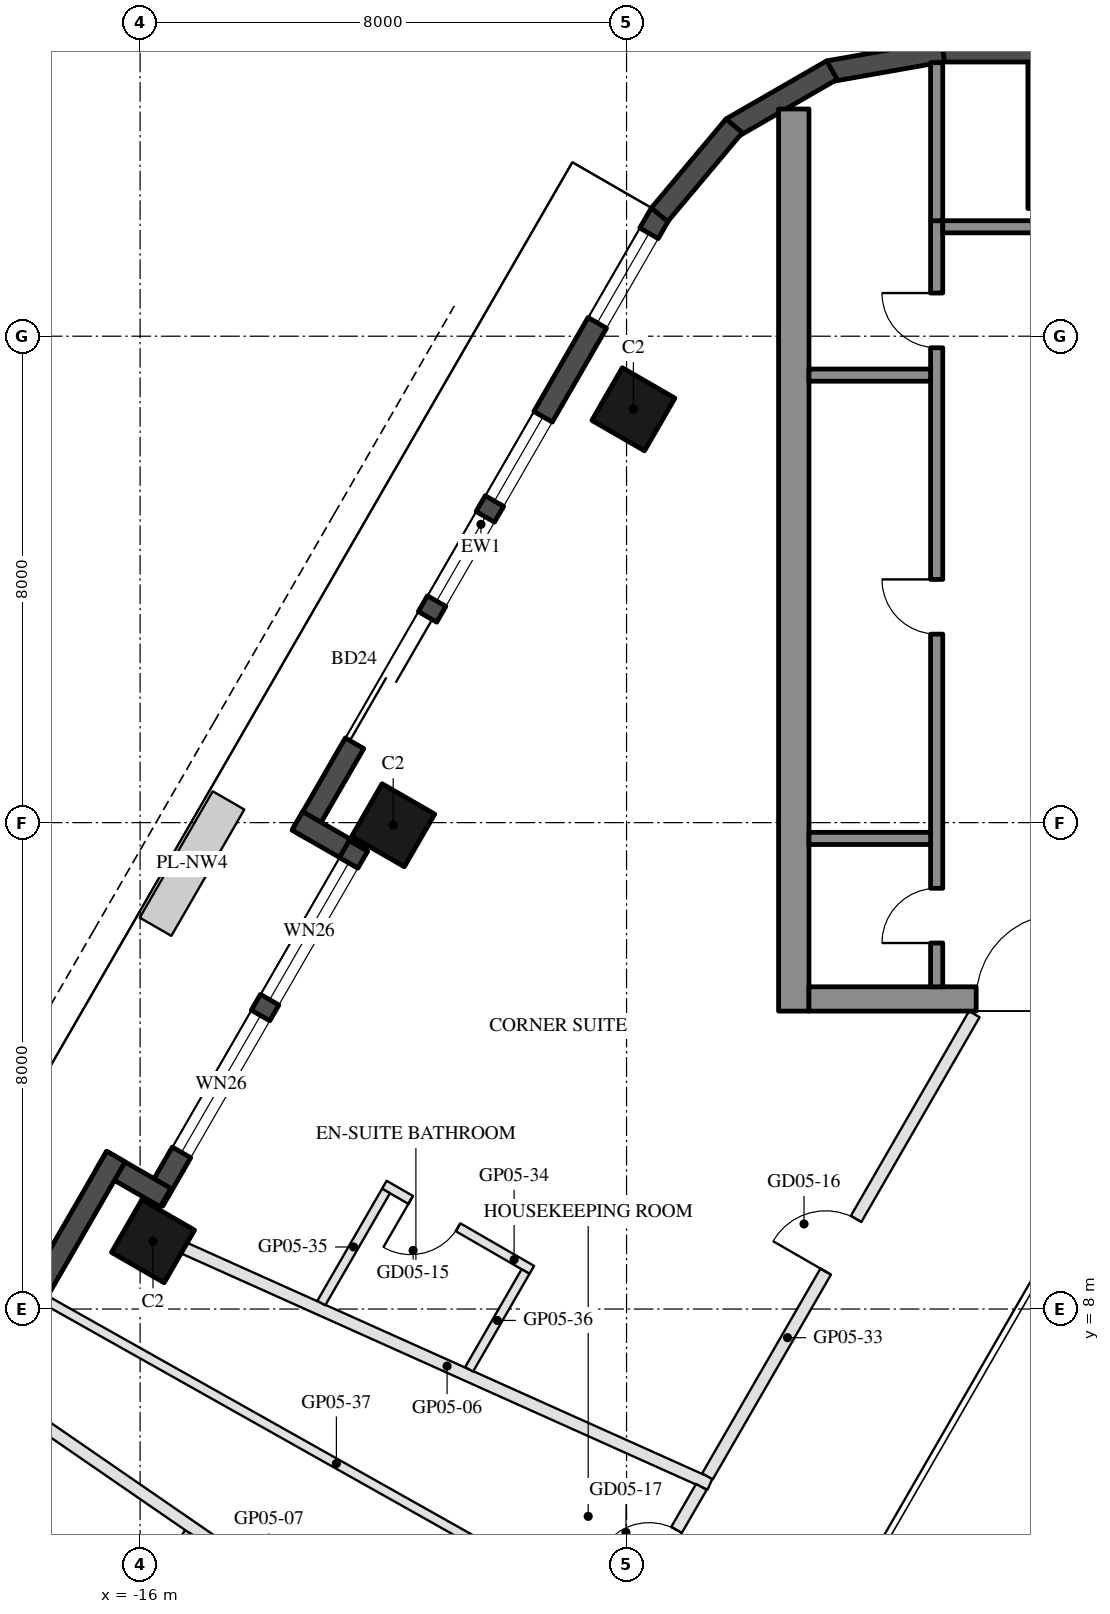
"""IFC4 building model, lengths in metres.
Left out: names, types, materials, properties, quantities, classifications, styles, units other than length and angle.
Written with IfcOpenShell. Run it as: python <this file> out.ifc"""

import sys

from ifc_helpers import new_model, si_unit, direction, frame, frame_2d, origin, origin_2d, place, context, subcontext, project, spatial, rectangle, hollow_rectangle, extrude, element, fill, save


model = new_model("IFC4")
c1 = context("Model", 3, precision=1e-05, world=origin(), true_north=direction((0.0, 1.0)))
c2 = subcontext(c1, "Body", "Model", "MODEL_VIEW")
j1 = project(units=[si_unit("LENGTHUNIT", "METRE"), si_unit("PLANEANGLEUNIT", "RADIAN")], contexts=[c1])
p1 = place(None, origin())
s1 = spatial("IfcSite", under=j1, at=p1, CompositionType="ELEMENT")
p2 = place(p1, origin())
s2 = spatial("IfcBuilding", under=s1, at=p2, CompositionType="ELEMENT")
p3 = place(p2, frame((0.0, 0.0, 83.5)))
s3 = spatial("IfcBuildingStorey", under=s2, at=p3, CompositionType="ELEMENT", Elevation=83.5)
for number, where, z_axis, x_axis in (
    (1, (-7.888, 22.798, 0.0), (0.0, 0.0, 1.0), (0.5, 0.866, 0.0)),
    (2, (-11.838, 15.957, 0.0), (0.0, 0.0, 1.0), (0.5, 0.866, 0.0)),
    (3, (-15.788, 9.115, 0.0), (0.0, 0.0, 1.0), (0.5, 0.866, 0.0)),
):
    element("IfcColumn", number, at=place(p3, frame(where, z_axis=z_axis, x_axis=x_axis)), inside=s3, PredefinedType="COLUMN", context=c2, shape_type="SweptSolid", body=[
        extrude(hollow_rectangle(XDim=1.0, YDim=1.0, WallThickness=0.045, at=origin_2d()), origin(), (0.0, 0.0, 1.0), 3.7),
    ])
p4 = place(p3, frame((0.0, 27.3, 0.0), z_axis=(0.0, 0.0, 1.0), x_axis=(1.0, 0.0, 0.0)))
e4 = element("IfcColumn", 4, at=p4, inside=s3, PredefinedType="COLUMN", context=c2, shape_type="SweptSolid", body=[
    extrude(hollow_rectangle(XDim=2.8, YDim=2.4, WallThickness=0.07, at=origin_2d()), origin(), (0.0, 0.0, 1.0), 3.7),
])
p5 = place(p3, frame((-7.441, 26.022, 0.0), z_axis=(0.0, 0.0, 1.0), x_axis=(-0.499992533062, -0.86602971478, 0.0)))
e5 = element("IfcWall", 5, at=p5, inside=s3, PredefinedType="SOLIDWALL", context=c2, shape_type="SweptSolid", body=[
    extrude(rectangle(XDim=11.816, YDim=0.35, at=frame_2d((5.908, 0.0))), origin(), (0.0, 0.0, 1.0), 3.55),
])
p6 = place(p5, frame((0.381, 0.0, 0.3)))
e6 = element("IfcOpeningElement", 6, at=p6, cuts=e5, PredefinedType="OPENING", context=c2, shape_type="SweptSolid", body=[
    extrude(rectangle(XDim=1.7, YDim=2.65, at=frame_2d((0.85, 1.325))), frame((0.0, 0.185, 0.0), z_axis=(0.0, -1.0, 0.0), x_axis=(1.0, 0.0, 0.0)), (0.0, 0.0, 1.0), 0.37),
])
p7 = place(p5, frame((7.666, 0.0, 0.0)))
e7 = element("IfcOpeningElement", 7, at=p7, cuts=e5, PredefinedType="OPENING", context=c2, shape_type="SweptSolid", body=[
    extrude(rectangle(XDim=2.4, YDim=2.4, at=frame_2d((1.2, 1.2))), frame((0.0, 0.185, 0.0), z_axis=(0.0, -1.0, 0.0), x_axis=(1.0, 0.0, 0.0)), (0.0, 0.0, 1.0), 0.37),
])
p8 = place(p5, frame((3.865, 0.0, 0.3)))
e8 = element("IfcOpeningElement", 8, at=p8, cuts=e5, PredefinedType="OPENING", context=c2, shape_type="SweptSolid", body=[
    extrude(rectangle(XDim=1.6, YDim=2.65, at=frame_2d((0.8, 1.325))), frame((0.0, 0.185, 0.0), z_axis=(0.0, -1.0, 0.0), x_axis=(1.0, 0.0, 0.0)), (0.0, 0.0, 1.0), 0.37),
])
p9 = place(p5, frame((5.765, 0.0, 0.3)))
e9 = element("IfcOpeningElement", 9, at=p9, cuts=e5, PredefinedType="OPENING", context=c2, shape_type="SweptSolid", body=[
    extrude(rectangle(XDim=1.6, YDim=2.65, at=frame_2d((0.8, 1.325))), frame((0.0, 0.185, 0.0), z_axis=(0.0, -1.0, 0.0), x_axis=(1.0, 0.0, 0.0)), (0.0, 0.0, 1.0), 0.37),
])
p10 = place(p3, frame((-13.413, 16.029, 0.0), z_axis=(0.0, 0.0, 1.0), x_axis=(0.866005645448, -0.500034220881, 0.0)))
e10 = element("IfcWall", 10, at=p10, inside=s3, PredefinedType="SOLIDWALL", context=c2, shape_type="SweptSolid", body=[
    extrude(rectangle(XDim=1.22, YDim=0.35, at=frame_2d((0.61, 0.0))), origin(), (0.0, 0.0, 1.0), 3.55),
])
p11 = place(p3, frame((-12.409, 15.617, 0.0), z_axis=(0.0, 0.0, 1.0), x_axis=(-0.500003597184, -0.866023326939, 0.0)))
e11 = element("IfcWall", 11, at=p11, inside=s3, PredefinedType="SOLIDWALL", context=c2, shape_type="SweptSolid", body=[
    extrude(rectangle(XDim=6.74, YDim=0.35, at=frame_2d((3.37, 0.0))), origin(), (0.0, 0.0, 1.0), 3.55),
])
p12 = place(p11, frame((0.32, 0.0, 0.3)))
e12 = element("IfcOpeningElement", 12, at=p12, cuts=e11, PredefinedType="OPENING", context=c2, shape_type="SweptSolid", body=[
    extrude(rectangle(XDim=2.6, YDim=2.65, at=frame_2d((1.3, 1.325))), frame((0.0, 0.185, 0.0), z_axis=(0.0, -1.0, 0.0), x_axis=(1.0, 0.0, 0.0)), (0.0, 0.0, 1.0), 0.37),
])
p13 = place(p11, frame((3.22, 0.0, 0.3)))
e13 = element("IfcOpeningElement", 13, at=p13, cuts=e11, PredefinedType="OPENING", context=c2, shape_type="SweptSolid", body=[
    extrude(rectangle(XDim=2.6, YDim=2.65, at=frame_2d((1.3, 1.325))), frame((0.0, 0.185, 0.0), z_axis=(0.0, -1.0, 0.0), x_axis=(1.0, 0.0, 0.0)), (0.0, 0.0, 1.0), 0.37),
])
p14 = place(p3, frame((-15.581, 9.833, 0.0), z_axis=(0.0, 0.0, 1.0), x_axis=(-0.866055662726, 0.499947586314, 0.0)))
e14 = element("IfcWall", 14, at=p14, inside=s3, PredefinedType="SOLIDWALL", context=c2, shape_type="SweptSolid", body=[
    extrude(rectangle(XDim=1.22, YDim=0.35, at=frame_2d((0.61, 0.0))), origin(), (0.0, 0.0, 1.0), 3.55),
])
p15 = place(p3, frame((-16.398, 10.507, 0.0), z_axis=(0.0, 0.0, 1.0), x_axis=(-0.499999142773, -0.866025898704, 0.0)))
e15 = element("IfcWall", 15, at=p15, inside=s3, PredefinedType="SOLIDWALL", context=c2, shape_type="SweptSolid", body=[
    extrude(rectangle(XDim=9.7, YDim=0.35, at=frame_2d((4.85, 0.0))), origin(), (0.0, 0.0, 1.0), 3.55),
])
p16 = place(p15, frame((4.79, 0.0, 0.3)))
e16 = element("IfcOpeningElement", 16, at=p16, cuts=e15, PredefinedType="OPENING", context=c2, shape_type="SweptSolid", body=[
    extrude(rectangle(XDim=3.1, YDim=2.65, at=frame_2d((1.55, 1.325))), frame((0.0, 0.185, 0.0), z_axis=(0.0, -1.0, 0.0), x_axis=(1.0, 0.0, 0.0)), (0.0, 0.0, 1.0), 0.37),
])
p17 = place(p3, frame((2.829, 28.685, 0.0), z_axis=(0.0, 0.0, 1.0), x_axis=(-1.0, 0.0, 0.0)))
e17 = element("IfcWall", 17, at=p17, inside=s3, PredefinedType="SOLIDWALL", context=c2, shape_type="SweptSolid", body=[
    extrude(rectangle(XDim=5.658, YDim=0.35, at=frame_2d((2.829, 0.0))), origin(), (0.0, 0.0, 1.0), 3.55),
])
for number, where, z_axis, x_axis in (
    (18, (-2.799, 28.688, 0.0), (0.0, 0.0, 1.0), (-0.985, -0.174, 0.0)),
    (19, (-4.623, 28.377, 0.0), (0.0, 0.0, 1.0), (-0.866, -0.5, 0.0)),
):
    element("IfcWall", number, at=place(p3, frame(where, z_axis=z_axis, x_axis=x_axis)), inside=s3, PredefinedType="SOLIDWALL", context=c2, shape_type="SweptSolid", body=[
        extrude(rectangle(XDim=1.91, YDim=0.35, at=frame_2d((0.955, 0.0))), origin(), (0.0, 0.0, 1.0), 3.55),
    ])
p18 = place(p3, frame((-6.23, 27.461, 0.0), z_axis=(0.0, 0.0, 1.0), x_axis=(-0.642808304945, -0.766027077259, 0.0)))
e20 = element("IfcWall", 20, at=p18, inside=s3, PredefinedType="SOLIDWALL", context=c2, shape_type="SweptSolid", body=[
    extrude(rectangle(XDim=1.91, YDim=0.35, at=frame_2d((0.955, 0.0))), origin(), (0.0, 0.0, 1.0), 3.55),
])
p19 = place(p3, frame((-5.25, 12.9, 0.0), z_axis=(0.0, 0.0, 1.0), x_axis=(0.0, 1.0, 0.0)))
e21 = element("IfcWall", 21, at=p19, inside=s3, PredefinedType="SHEAR", context=c2, shape_type="SweptSolid", body=[
    extrude(rectangle(XDim=14.837, YDim=0.5, at=frame_2d((7.418, 0.0))), origin(), (0.0, 0.0, 1.0), 3.5),
])
p20 = place(p3, frame((5.0, 13.1, 0.0), z_axis=(0.0, 0.0, 1.0), x_axis=(-1.0, 0.0, 0.0)))
e22 = element("IfcWall", 22, at=p20, inside=s3, PredefinedType="SHEAR", context=c2, shape_type="SweptSolid", body=[
    extrude(rectangle(XDim=10.0, YDim=0.4, at=frame_2d((5.0, 0.0))), origin(), (0.0, 0.0, 1.0), 3.5),
])
p21 = place(p20, frame((3.55, 0.0, 0.0)))
e23 = element("IfcOpeningElement", 23, at=p21, cuts=e22, PredefinedType="OPENING", context=c2, shape_type="SweptSolid", body=[
    extrude(rectangle(XDim=1.1, YDim=2.1, at=frame_2d((0.55, 1.05))), frame((0.0, 0.21, 0.0), z_axis=(0.0, -1.0, 0.0), x_axis=(1.0, 0.0, 0.0)), (0.0, 0.0, 1.0), 0.42),
])
p22 = place(p20, frame((5.85, 0.0, 0.0)))
e24 = element("IfcOpeningElement", 24, at=p22, cuts=e22, PredefinedType="OPENING", context=c2, shape_type="SweptSolid", body=[
    extrude(rectangle(XDim=1.4, YDim=2.1, at=frame_2d((0.7, 1.05))), frame((0.0, 0.21, 0.0), z_axis=(0.0, -1.0, 0.0), x_axis=(1.0, 0.0, 0.0)), (0.0, 0.0, 1.0), 0.42),
])
p23 = place(p3, frame((-2.9, 13.3, 0.0), z_axis=(0.0, 0.0, 1.0), x_axis=(0.0, 1.0, 0.0)))
e25 = element("IfcWall", 25, at=p23, inside=s3, PredefinedType="SHEAR", context=c2, shape_type="SweptSolid", body=[
    extrude(rectangle(XDim=12.6, YDim=0.2, at=frame_2d((6.3, 0.0))), origin(), (0.0, 0.0, 1.0), 3.5),
])
p24 = place(p23, frame((0.72, 0.0, 0.0)))
e26 = element("IfcOpeningElement", 26, at=p24, cuts=e25, PredefinedType="OPENING", context=c2, shape_type="SweptSolid", body=[
    extrude(rectangle(XDim=0.9, YDim=2.1, at=frame_2d((0.45, 1.05))), frame((0.0, 0.11, 0.0), z_axis=(0.0, -1.0, 0.0), x_axis=(1.0, 0.0, 0.0)), (0.0, 0.0, 1.0), 0.22),
])
p25 = place(p23, frame((5.8, 0.0, 0.0)))
e27 = element("IfcOpeningElement", 27, at=p25, cuts=e25, PredefinedType="OPENING", context=c2, shape_type="SweptSolid", body=[
    extrude(rectangle(XDim=0.9, YDim=2.1, at=frame_2d((0.45, 1.05))), frame((0.0, 0.11, 0.0), z_axis=(0.0, -1.0, 0.0), x_axis=(1.0, 0.0, 0.0)), (0.0, 0.0, 1.0), 0.22),
])
p26 = place(p23, frame((10.51, 0.0, 0.0)))
e28 = element("IfcOpeningElement", 28, at=p26, cuts=e25, PredefinedType="OPENING", context=c2, shape_type="SweptSolid", body=[
    extrude(rectangle(XDim=0.9, YDim=2.1, at=frame_2d((0.45, 1.05))), frame((0.0, 0.11, 0.0), z_axis=(0.0, -1.0, 0.0), x_axis=(1.0, 0.0, 0.0)), (0.0, 0.0, 1.0), 0.22),
])
p27 = place(p3, frame((-0.4, 25.8, 0.0), z_axis=(0.0, 0.0, 1.0), x_axis=(-1.0, 0.0, 0.0)))
e29 = element("IfcWall", 29, at=p27, inside=s3, PredefinedType="SHEAR", context=c2, shape_type="SweptSolid", body=[
    extrude(rectangle(XDim=2.4, YDim=0.2, at=frame_2d((1.2, 0.0))), origin(), (0.0, 0.0, 1.0), 3.5),
])
for number, where, z_axis, x_axis in (
    (30, (-3.0, 15.74, 0.0), (0.0, 0.0, 1.0), (-1.0, 0.0, 0.0)),
    (31, (-3.0, 23.36, 0.0), (0.0, 0.0, 1.0), (-1.0, 0.0, 0.0)),
):
    element("IfcWall", number, at=place(p3, frame(where, z_axis=z_axis, x_axis=x_axis)), inside=s3, PredefinedType="SHEAR", context=c2, shape_type="SweptSolid", body=[
        extrude(rectangle(XDim=2.0, YDim=0.2, at=frame_2d((1.0, 0.0))), origin(), (0.0, 0.0, 1.0), 3.5),
    ])
p28 = place(p3, frame((-2.9, 25.9, 0.0), z_axis=(0.0, 0.0, 1.0), x_axis=(0.0, 1.0, 0.0)))
e32 = element("IfcWall", 32, at=p28, inside=s3, PredefinedType="SHEAR", context=c2, shape_type="SweptSolid", body=[
    extrude(rectangle(XDim=2.6, YDim=0.2, at=frame_2d((1.3, 0.0))), origin(), (0.0, 0.0, 1.0), 3.5),
])
p29 = place(p3, frame((-15.275, 9.002, 0.0), z_axis=(0.0, 0.0, 1.0), x_axis=(0.912310970981, -0.409498097954, 0.0)))
e33 = element("IfcWall", 33, at=p29, inside=s3, PredefinedType="PARTITIONING", context=c2, shape_type="SweptSolid", body=[
    extrude(rectangle(XDim=9.479, YDim=0.2, at=frame_2d((4.74, 0.0))), origin(), (0.0, 0.0, 1.0), 2.95),
])
p30 = place(p3, frame((-18.417, 6.661, 0.0), z_axis=(0.0, 0.0, 1.0), x_axis=(0.823524858714, -0.56728018393, 0.0)))
e34 = element("IfcWall", 34, at=p30, inside=s3, PredefinedType="PARTITIONING", context=c2, shape_type="SweptSolid", body=[
    extrude(rectangle(XDim=11.015, YDim=0.2, at=frame_2d((5.507, 0.0))), origin(), (0.0, 0.0, 1.0), 2.95),
])
p31 = place(p3, frame((-6.669, 5.249, 0.0), z_axis=(0.0, 0.0, 1.0), x_axis=(0.499992114976, 0.866029956157, 0.0)))
e35 = element("IfcWall", 35, at=p31, inside=s3, PredefinedType="PARTITIONING", context=c2, shape_type="SweptSolid", body=[
    extrude(rectangle(XDim=8.778, YDim=0.2, at=frame_2d((4.389, 0.0))), origin(), (0.0, 0.0, 1.0), 2.95),
])
p32 = place(p31, frame((3.889, 0.0, 0.0)))
e36 = element("IfcOpeningElement", 36, at=p32, cuts=e35, PredefinedType="OPENING", context=c2, shape_type="SweptSolid", body=[
    extrude(rectangle(XDim=1.0, YDim=2.1, at=frame_2d((0.5, 1.05))), frame((0.0, 0.11, 0.0), z_axis=(0.0, -1.0, 0.0), x_axis=(1.0, 0.0, 0.0)), (0.0, 0.0, 1.0), 0.22),
])
p33 = place(p3, frame((-9.558, 8.645, 0.0), z_axis=(0.0, 0.0, 1.0), x_axis=(-0.866034573852, 0.49998411664, 0.0)))
e37 = element("IfcWall", 37, at=p33, inside=s3, PredefinedType="PARTITIONING", context=c2, shape_type="SweptSolid", body=[
    extrude(rectangle(XDim=2.8, YDim=0.15, at=frame_2d((1.4, 0.0))), origin(), (0.0, 0.0, 1.0), 3.55),
])
p34 = place(p33, frame((1.4, 0.0, 0.0)))
e38 = element("IfcOpeningElement", 38, at=p34, cuts=e37, PredefinedType="OPENING", context=c2, shape_type="SweptSolid", body=[
    extrude(rectangle(XDim=0.9, YDim=2.1, at=frame_2d((0.45, 1.05))), frame((0.0, 0.085, 0.0), z_axis=(0.0, -1.0, 0.0), x_axis=(1.0, 0.0, 0.0)), (0.0, 0.0, 1.0), 0.17),
])
p35 = place(p3, frame((-11.956, 9.942, 0.0), z_axis=(0.0, 0.0, 1.0), x_axis=(-0.50001378257, -0.866017446268, 0.0)))
e39 = element("IfcWall", 39, at=p35, inside=s3, PredefinedType="PARTITIONING", context=c2, shape_type="SweptSolid", body=[
    extrude(rectangle(XDim=2.128, YDim=0.15, at=frame_2d((1.064, 0.0))), origin(), (0.0, 0.0, 1.0), 3.55),
])
p36 = place(p3, frame((-9.661, 8.617, 0.0), z_axis=(0.0, 0.0, 1.0), x_axis=(-0.499984136491, -0.866034562392, 0.0)))
e40 = element("IfcWall", 40, at=p36, inside=s3, PredefinedType="PARTITIONING", context=c2, shape_type="SweptSolid", body=[
    extrude(rectangle(XDim=1.857, YDim=0.15, at=frame_2d((0.929, 0.0))), origin(), (0.0, 0.0, 1.0), 3.55),
])
p37 = place(p3, frame((-17.557, 8.15, 0.0), z_axis=(0.0, 0.0, 1.0), x_axis=(0.87154168957, -0.490321408202, 0.0)))
e41 = element("IfcWall", 41, at=p37, inside=s3, PredefinedType="PARTITIONING", context=c2, shape_type="SweptSolid", body=[
    extrude(rectangle(XDim=10.981, YDim=0.15, at=frame_2d((5.49, 0.0))), origin(), (0.0, 0.0, 1.0), 2.96),
])
p38 = place(p3, frame((-8.037, 2.88, 0.0), z_axis=(0.0, 0.0, 1.0), x_axis=(0.500025521233, 0.866010668592, 0.0)))
e42 = element("IfcWall", 42, at=p38, inside=s3, PredefinedType="PARTITIONING", context=c2, shape_type="SweptSolid", body=[
    extrude(rectangle(XDim=2.533, YDim=0.2, at=frame_2d((1.267, 0.0))), origin(), (0.0, 0.0, 1.0), 2.95),
])
p39 = place(p38, frame((0.817, 0.0, 0.0)))
e43 = element("IfcOpeningElement", 43, at=p39, cuts=e42, PredefinedType="OPENING", context=c2, shape_type="SweptSolid", body=[
    extrude(rectangle(XDim=0.9, YDim=2.1, at=frame_2d((0.45, 1.05))), frame((0.0, 0.11, 0.0), z_axis=(0.0, -1.0, 0.0), x_axis=(1.0, 0.0, 0.0)), (0.0, 0.0, 1.0), 0.22),
])
p40 = place(p3, frame((-15.2, 4.323, 0.0), z_axis=(0.0, 0.0, 1.0), x_axis=(-0.499974592989, -0.866040072032, 0.0)))
e44 = element("IfcWall", 44, at=p40, inside=s3, PredefinedType="PARTITIONING", context=c2, shape_type="SweptSolid", body=[
    extrude(rectangle(XDim=2.067, YDim=0.15, at=frame_2d((1.034, 0.0))), origin(), (0.0, 0.0, 1.0), 2.95),
])
p41 = place(p6, origin())
e45 = element("IfcWindow", 45, at=p41, inside=s3, PartitioningType="SINGLE_PANEL", PredefinedType="WINDOW", context=c2, shape_type="SweptSolid", body=[
    extrude(rectangle(XDim=1.7, YDim=2.65, at=frame_2d((0.85, 1.325))), frame((0.0, 0.03, 0.0), z_axis=(0.0, -1.0, 0.0), x_axis=(1.0, 0.0, 0.0)), (0.0, 0.0, 1.0), 0.06),
])
fill(e6, e45)
p42 = place(p7, frame((2.4, 0.0, 0.0), z_axis=(0.0, 0.0, 1.0), x_axis=(-1.0, 0.0, 0.0)))
e46 = element("IfcDoor", 46, at=p42, inside=s3, OperationType="SLIDING_TO_LEFT", PredefinedType="DOOR", context=c2, shape_type="SweptSolid", body=[
    extrude(rectangle(XDim=2.4, YDim=2.4, at=frame_2d((1.2, 1.2))), frame((0.0, 0.025, 0.0), z_axis=(0.0, -1.0, 0.0), x_axis=(1.0, 0.0, 0.0)), (0.0, 0.0, 1.0), 0.05),
])
fill(e7, e46)
p43 = place(p8, origin())
e47 = element("IfcWindow", 47, at=p43, inside=s3, PartitioningType="SINGLE_PANEL", PredefinedType="WINDOW", context=c2, shape_type="SweptSolid", body=[
    extrude(rectangle(XDim=1.6, YDim=2.65, at=frame_2d((0.8, 1.325))), frame((0.0, 0.03, 0.0), z_axis=(0.0, -1.0, 0.0), x_axis=(1.0, 0.0, 0.0)), (0.0, 0.0, 1.0), 0.06),
])
fill(e8, e47)
p44 = place(p9, origin())
e48 = element("IfcWindow", 48, at=p44, inside=s3, PartitioningType="SINGLE_PANEL", PredefinedType="WINDOW", context=c2, shape_type="SweptSolid", body=[
    extrude(rectangle(XDim=1.6, YDim=2.65, at=frame_2d((0.8, 1.325))), frame((0.0, 0.03, 0.0), z_axis=(0.0, -1.0, 0.0), x_axis=(1.0, 0.0, 0.0)), (0.0, 0.0, 1.0), 0.06),
])
fill(e9, e48)
p45 = place(p12, origin())
e49 = element("IfcWindow", 49, at=p45, inside=s3, PartitioningType="SINGLE_PANEL", PredefinedType="WINDOW", context=c2, shape_type="SweptSolid", body=[
    extrude(rectangle(XDim=2.6, YDim=2.65, at=frame_2d((1.3, 1.325))), frame((0.0, 0.03, 0.0), z_axis=(0.0, -1.0, 0.0), x_axis=(1.0, 0.0, 0.0)), (0.0, 0.0, 1.0), 0.06),
])
fill(e12, e49)
p46 = place(p13, origin())
e50 = element("IfcWindow", 50, at=p46, inside=s3, PartitioningType="SINGLE_PANEL", PredefinedType="WINDOW", context=c2, shape_type="SweptSolid", body=[
    extrude(rectangle(XDim=2.6, YDim=2.65, at=frame_2d((1.3, 1.325))), frame((0.0, 0.03, 0.0), z_axis=(0.0, -1.0, 0.0), x_axis=(1.0, 0.0, 0.0)), (0.0, 0.0, 1.0), 0.06),
])
fill(e13, e50)
p47 = place(p24, origin())
e51 = element("IfcDoor", 51, at=p47, inside=s3, OperationType="SINGLE_SWING_LEFT", PredefinedType="DOOR", context=c2, shape_type="SweptSolid", body=[
    extrude(rectangle(XDim=0.9, YDim=2.1, at=frame_2d((0.45, 1.05))), frame((0.0, 0.025, 0.0), z_axis=(0.0, -1.0, 0.0), x_axis=(1.0, 0.0, 0.0)), (0.0, 0.0, 1.0), 0.05),
])
fill(e26, e51)
p48 = place(p25, origin())
e52 = element("IfcDoor", 52, at=p48, inside=s3, OperationType="SINGLE_SWING_RIGHT", PredefinedType="DOOR", context=c2, shape_type="SweptSolid", body=[
    extrude(rectangle(XDim=0.9, YDim=2.1, at=frame_2d((0.45, 1.05))), frame((0.0, 0.025, 0.0), z_axis=(0.0, -1.0, 0.0), x_axis=(1.0, 0.0, 0.0)), (0.0, 0.0, 1.0), 0.05),
])
fill(e27, e52)
p49 = place(p26, origin())
e53 = element("IfcDoor", 53, at=p49, inside=s3, OperationType="SINGLE_SWING_RIGHT", PredefinedType="DOOR", context=c2, shape_type="SweptSolid", body=[
    extrude(rectangle(XDim=0.9, YDim=2.1, at=frame_2d((0.45, 1.05))), frame((0.0, 0.025, 0.0), z_axis=(0.0, -1.0, 0.0), x_axis=(1.0, 0.0, 0.0)), (0.0, 0.0, 1.0), 0.05),
])
fill(e28, e53)
p50 = place(p22, frame((1.4, 0.0, 0.0), z_axis=(0.0, 0.0, 1.0), x_axis=(-1.0, 0.0, 0.0)))
e54 = element("IfcDoor", 54, at=p50, inside=s3, OperationType="DOUBLE_DOOR_SINGLE_SWING", PredefinedType="DOOR", context=c2, shape_type="SweptSolid", body=[
    extrude(rectangle(XDim=1.4, YDim=2.1, at=frame_2d((0.7, 1.05))), frame((0.0, 0.025, 0.0), z_axis=(0.0, -1.0, 0.0), x_axis=(1.0, 0.0, 0.0)), (0.0, 0.0, 1.0), 0.05),
])
fill(e24, e54)
p51 = place(p34, origin())
e55 = element("IfcDoor", 55, at=p51, inside=s3, OperationType="SINGLE_SWING_RIGHT", PredefinedType="DOOR", context=c2, shape_type="SweptSolid", body=[
    extrude(rectangle(XDim=0.9, YDim=2.1, at=frame_2d((0.45, 1.05))), frame((0.0, 0.025, 0.0), z_axis=(0.0, -1.0, 0.0), x_axis=(1.0, 0.0, 0.0)), (0.0, 0.0, 1.0), 0.05),
])
fill(e38, e55)
p52 = place(p32, origin())
e56 = element("IfcDoor", 56, at=p52, inside=s3, OperationType="SINGLE_SWING_LEFT", PredefinedType="DOOR", context=c2, shape_type="SweptSolid", body=[
    extrude(rectangle(XDim=1.0, YDim=2.1, at=frame_2d((0.5, 1.05))), frame((0.0, 0.025, 0.0), z_axis=(0.0, -1.0, 0.0), x_axis=(1.0, 0.0, 0.0)), (0.0, 0.0, 1.0), 0.05),
])
fill(e36, e56)
p53 = place(p39, origin())
e57 = element("IfcDoor", 57, at=p53, inside=s3, OperationType="SINGLE_SWING_LEFT", PredefinedType="DOOR", context=c2, shape_type="SweptSolid", body=[
    extrude(rectangle(XDim=0.9, YDim=2.1, at=frame_2d((0.45, 1.05))), frame((0.0, 0.025, 0.0), z_axis=(0.0, -1.0, 0.0), x_axis=(1.0, 0.0, 0.0)), (0.0, 0.0, 1.0), 0.05),
])
fill(e43, e57)
save(model, sys.argv[1])
